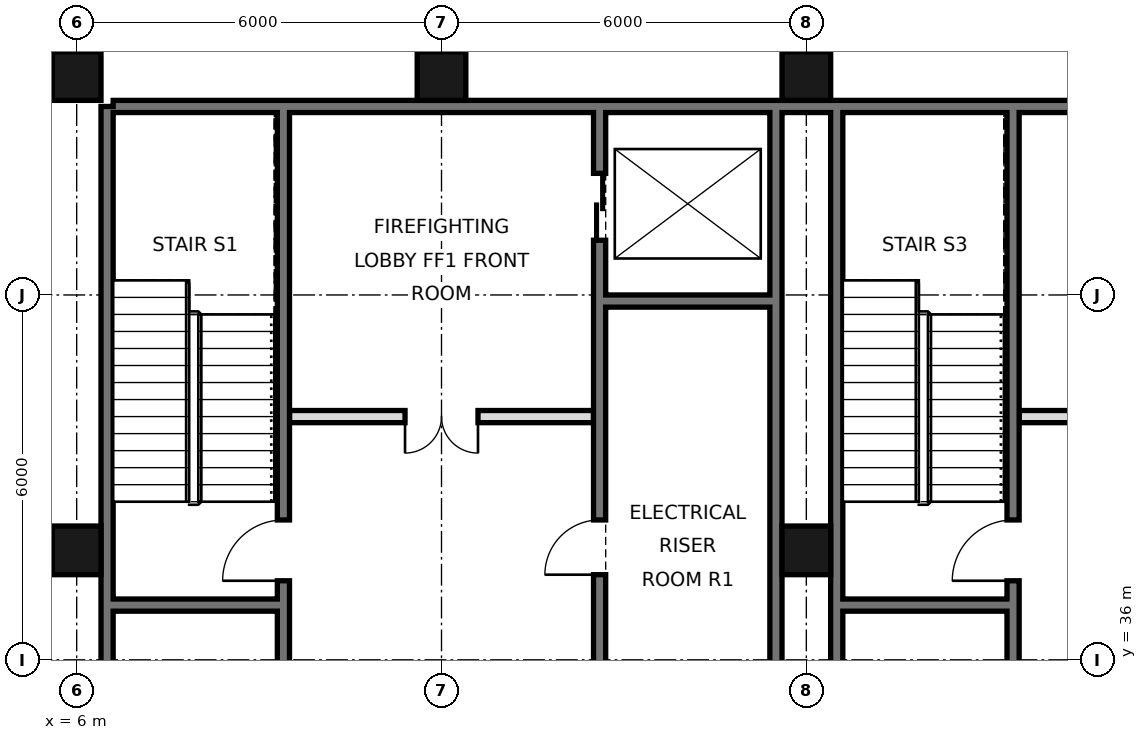
"""IFC4 building model, lengths in metres.
Left out: names, types, materials, properties, quantities, classifications, styles, units other than length and angle.
Written with IfcOpenShell. Run it as: python <this file> out.ifc"""

import sys

from ifc_helpers import new_model, si_unit, direction, frame, frame_2d, origin, origin_2d, place, context, subcontext, project, spatial, rectangle, hollow_rectangle, extrude, element, fill, save


model = new_model("IFC4")
c1 = context("Model", 3, precision=1e-05, world=origin(), true_north=direction((0.0, 1.0)))
c2 = subcontext(c1, "Body", "Model", "MODEL_VIEW")
j1 = project(units=[si_unit("LENGTHUNIT", "METRE"), si_unit("PLANEANGLEUNIT", "RADIAN")], contexts=[c1])
p1 = place(None, origin())
s1 = spatial("IfcSite", under=j1, at=p1, CompositionType="ELEMENT")
p2 = place(p1, origin())
s2 = spatial("IfcBuilding", under=s1, at=p2, CompositionType="ELEMENT")
p3 = place(p2, frame((0.0, 0.0, 277.4)))
s3 = spatial("IfcBuildingStorey", under=s2, at=p3, CompositionType="ELEMENT", Elevation=277.4)
for number, where, z_axis, x_axis in (
    (1, (6.0, 37.8, 0.0), (0.0, 0.0, 1.0), (1.0, 0.0, 0.0)),
    (2, (6.0, 45.6, 0.0), (0.0, 0.0, 1.0), (1.0, 0.0, 0.0)),
    (3, (12.0, 45.6, 0.0), (0.0, 0.0, 1.0), (1.0, 0.0, 0.0)),
    (4, (18.0, 37.8, 0.0), (0.0, 0.0, 1.0), (1.0, 0.0, 0.0)),
    (5, (18.0, 45.6, 0.0), (0.0, 0.0, 1.0), (1.0, 0.0, 0.0)),
):
    element("IfcColumn", number, at=place(p3, frame(where, z_axis=z_axis, x_axis=x_axis)), inside=s3, PredefinedType="COLUMN", context=c2, shape_type="SweptSolid", body=[
        extrude(hollow_rectangle(XDim=0.8, YDim=0.8, WallThickness=0.032, at=origin_2d()), origin(), (0.0, 0.0, 1.0), 4.4),
    ])
p4 = place(p3, frame((6.5, 21.6, 0.0), z_axis=(0.0, 0.0, 1.0), x_axis=(0.0, 1.0, 0.0)))
e6 = element("IfcWall", 6, at=p4, inside=s3, PredefinedType="SOLIDWALL", context=c2, shape_type="SweptSolid", body=[
    extrude(rectangle(XDim=23.5, YDim=0.2, at=frame_2d((11.75, 0.0))), origin(), (0.0, 0.0, 1.0), 4.1),
])
p5 = place(p3, frame((6.6, 45.1, 0.0), z_axis=(0.0, 0.0, 1.0), x_axis=(1.0, 0.0, 0.0)))
e7 = element("IfcWall", 7, at=p5, inside=s3, PredefinedType="SOLIDWALL", context=c2, shape_type="SweptSolid", body=[
    extrude(rectangle(XDim=34.8, YDim=0.2, at=frame_2d((17.4, 0.0))), origin(), (0.0, 0.0, 1.0), 4.1),
])
for number, where, z_axis, x_axis in (
    (8, (17.5, 27.6, 0.0), (0.0, 0.0, 1.0), (0.0, 1.0, 0.0)),
    (9, (18.5, 27.6, 0.0), (0.0, 0.0, 1.0), (0.0, 1.0, 0.0)),
):
    element("IfcWall", number, at=place(p3, frame(where, z_axis=z_axis, x_axis=x_axis)), inside=s3, PredefinedType="SOLIDWALL", context=c2, shape_type="SweptSolid", body=[
        extrude(rectangle(XDim=17.5, YDim=0.2, at=frame_2d((8.75, 0.0))), origin(), (0.0, 0.0, 1.0), 4.1),
    ])
p6 = place(p3, frame((14.6, 27.5, 0.0), z_axis=(0.0, 0.0, 1.0), x_axis=(0.0, 1.0, 0.0)))
e10 = element("IfcWall", 10, at=p6, inside=s3, PredefinedType="SOLIDWALL", context=c2, shape_type="SweptSolid", body=[
    extrude(rectangle(XDim=17.5, YDim=0.2, at=frame_2d((8.75, 0.0))), origin(), (0.0, 0.0, 1.0), 4.1),
])
p7 = place(p6, frame((15.4, 0.0, 0.0)))
e11 = element("IfcOpeningElement", 11, at=p7, cuts=e10, PredefinedType="OPENING", context=c2, shape_type="SweptSolid", body=[
    extrude(rectangle(XDim=1.1, YDim=2.1, at=frame_2d((0.55, 1.05))), frame((0.0, 0.11, 0.0), z_axis=(0.0, -1.0, 0.0), x_axis=(1.0, 0.0, 0.0)), (0.0, 0.0, 1.0), 0.22),
])
p8 = place(p6, frame((2.7, 0.0, 0.0)))
e12 = element("IfcOpeningElement", 12, at=p8, cuts=e10, PredefinedType="OPENING", context=c2, shape_type="SweptSolid", body=[
    extrude(rectangle(XDim=1.0, YDim=2.1, at=frame_2d((0.5, 1.05))), frame((0.0, 0.11, 0.0), z_axis=(0.0, -1.0, 0.0), x_axis=(1.0, 0.0, 0.0)), (0.0, 0.0, 1.0), 0.22),
])
p9 = place(p6, frame((9.9, 0.0, 0.0)))
e13 = element("IfcOpeningElement", 13, at=p9, cuts=e10, PredefinedType="OPENING", context=c2, shape_type="SweptSolid", body=[
    extrude(rectangle(XDim=0.9, YDim=2.1, at=frame_2d((0.45, 1.05))), frame((0.0, 0.11, 0.0), z_axis=(0.0, -1.0, 0.0), x_axis=(1.0, 0.0, 0.0)), (0.0, 0.0, 1.0), 0.22),
])
p10 = place(p3, frame((21.4, 27.5, 0.0), z_axis=(0.0, 0.0, 1.0), x_axis=(0.0, 1.0, 0.0)))
e14 = element("IfcWall", 14, at=p10, inside=s3, PredefinedType="SOLIDWALL", context=c2, shape_type="SweptSolid", body=[
    extrude(rectangle(XDim=17.5, YDim=0.2, at=frame_2d((8.75, 0.0))), origin(), (0.0, 0.0, 1.0), 4.1),
])
p11 = place(p10, frame((0.6, 0.0, 0.0)))
e15 = element("IfcOpeningElement", 15, at=p11, cuts=e14, PredefinedType="OPENING", context=c2, shape_type="SweptSolid", body=[
    extrude(rectangle(XDim=1.0, YDim=2.1, at=frame_2d((0.5, 1.05))), frame((0.0, 0.11, 0.0), z_axis=(0.0, -1.0, 0.0), x_axis=(1.0, 0.0, 0.0)), (0.0, 0.0, 1.0), 0.22),
])
p12 = place(p10, frame((3.7, 0.0, 0.0)))
e16 = element("IfcOpeningElement", 16, at=p12, cuts=e14, PredefinedType="OPENING", context=c2, shape_type="SweptSolid", body=[
    extrude(rectangle(XDim=1.0, YDim=2.1, at=frame_2d((0.5, 1.05))), frame((0.0, 0.11, 0.0), z_axis=(0.0, -1.0, 0.0), x_axis=(1.0, 0.0, 0.0)), (0.0, 0.0, 1.0), 0.22),
])
p13 = place(p10, frame((9.8, 0.0, 0.0)))
e17 = element("IfcOpeningElement", 17, at=p13, cuts=e14, PredefinedType="OPENING", context=c2, shape_type="SweptSolid", body=[
    extrude(rectangle(XDim=1.0, YDim=2.1, at=frame_2d((0.5, 1.05))), frame((0.0, 0.11, 0.0), z_axis=(0.0, -1.0, 0.0), x_axis=(1.0, 0.0, 0.0)), (0.0, 0.0, 1.0), 0.22),
])
p14 = place(p10, frame((7.4, 0.0, 0.0)))
e18 = element("IfcOpeningElement", 18, at=p14, cuts=e14, PredefinedType="OPENING", context=c2, shape_type="SweptSolid", body=[
    extrude(rectangle(XDim=0.9, YDim=2.1, at=frame_2d((0.45, 1.05))), frame((0.0, 0.11, 0.0), z_axis=(0.0, -1.0, 0.0), x_axis=(1.0, 0.0, 0.0)), (0.0, 0.0, 1.0), 0.22),
])
p15 = place(p3, frame((9.4, 21.6, 0.0), z_axis=(0.0, 0.0, 1.0), x_axis=(0.0, 1.0, 0.0)))
e19 = element("IfcWall", 19, at=p15, inside=s3, PredefinedType="SOLIDWALL", context=c2, shape_type="SweptSolid", body=[
    extrude(rectangle(XDim=23.4, YDim=0.2, at=frame_2d((11.7, 0.0))), origin(), (0.0, 0.0, 1.0), 4.1),
])
p16 = place(p15, frame((7.95, 0.0, 0.0)))
e20 = element("IfcOpeningElement", 20, at=p16, cuts=e19, PredefinedType="OPENING", context=c2, shape_type="SweptSolid", body=[
    extrude(rectangle(XDim=1.0, YDim=2.1, at=frame_2d((0.5, 1.05))), frame((0.0, 0.11, 0.0), z_axis=(0.0, -1.0, 0.0), x_axis=(1.0, 0.0, 0.0)), (0.0, 0.0, 1.0), 0.22),
])
p17 = place(p15, frame((12.6, 0.0, 0.0)))
e21 = element("IfcOpeningElement", 21, at=p17, cuts=e19, PredefinedType="OPENING", context=c2, shape_type="SweptSolid", body=[
    extrude(rectangle(XDim=1.0, YDim=2.1, at=frame_2d((0.5, 1.05))), frame((0.0, 0.11, 0.0), z_axis=(0.0, -1.0, 0.0), x_axis=(1.0, 0.0, 0.0)), (0.0, 0.0, 1.0), 0.22),
])
p18 = place(p15, frame((15.7, 0.0, 0.0)))
e22 = element("IfcOpeningElement", 22, at=p18, cuts=e19, PredefinedType="OPENING", context=c2, shape_type="SweptSolid", body=[
    extrude(rectangle(XDim=1.0, YDim=2.1, at=frame_2d((0.5, 1.05))), frame((0.0, 0.11, 0.0), z_axis=(0.0, -1.0, 0.0), x_axis=(1.0, 0.0, 0.0)), (0.0, 0.0, 1.0), 0.22),
])
p19 = place(p15, frame((0.175, 0.0, 0.0)))
e23 = element("IfcOpeningElement", 23, at=p19, cuts=e19, PredefinedType="OPENING", context=c2, shape_type="SweptSolid", body=[
    extrude(rectangle(XDim=0.9, YDim=2.1, at=frame_2d((0.45, 1.05))), frame((0.0, 0.11, 0.0), z_axis=(0.0, -1.0, 0.0), x_axis=(1.0, 0.0, 0.0)), (0.0, 0.0, 1.0), 0.22),
])
for number, where, z_axis, x_axis in (
    (24, (18.6, 36.9, 0.0), (0.0, 0.0, 1.0), (1.0, 0.0, 0.0)),
    (25, (6.6, 36.9, 0.0), (0.0, 0.0, 1.0), (1.0, 0.0, 0.0)),
):
    element("IfcWall", number, at=place(p3, frame(where, z_axis=z_axis, x_axis=x_axis)), inside=s3, PredefinedType="SOLIDWALL", context=c2, shape_type="SweptSolid", body=[
        extrude(rectangle(XDim=2.7, YDim=0.2, at=frame_2d((1.35, 0.0))), origin(), (0.0, 0.0, 1.0), 4.1),
    ])
p20 = place(p3, frame((21.5, 40.0, 0.0), z_axis=(0.0, 0.0, 1.0), x_axis=(1.0, 0.0, 0.0)))
e26 = element("IfcWall", 26, at=p20, inside=s3, PredefinedType="PARTITIONING", context=c2, shape_type="SweptSolid", body=[
    extrude(rectangle(XDim=5.0, YDim=0.2, at=frame_2d((2.5, 0.0))), origin(), (0.0, 0.0, 1.0), 4.1),
])
p21 = place(p20, frame((1.9, 0.0, 0.0)))
e27 = element("IfcOpeningElement", 27, at=p21, cuts=e26, PredefinedType="OPENING", context=c2, shape_type="SweptSolid", body=[
    extrude(rectangle(XDim=1.2, YDim=2.1, at=frame_2d((0.6, 1.05))), frame((0.0, 0.11, 0.0), z_axis=(0.0, -1.0, 0.0), x_axis=(1.0, 0.0, 0.0)), (0.0, 0.0, 1.0), 0.22),
])
p22 = place(p3, frame((9.5, 40.0, 0.0), z_axis=(0.0, 0.0, 1.0), x_axis=(1.0, 0.0, 0.0)))
e28 = element("IfcWall", 28, at=p22, inside=s3, PredefinedType="PARTITIONING", context=c2, shape_type="SweptSolid", body=[
    extrude(rectangle(XDim=5.0, YDim=0.2, at=frame_2d((2.5, 0.0))), origin(), (0.0, 0.0, 1.0), 4.1),
])
p23 = place(p22, frame((1.9, 0.0, 0.0)))
e29 = element("IfcOpeningElement", 29, at=p23, cuts=e28, PredefinedType="OPENING", context=c2, shape_type="SweptSolid", body=[
    extrude(rectangle(XDim=1.2, YDim=2.1, at=frame_2d((0.6, 1.05))), frame((0.0, 0.11, 0.0), z_axis=(0.0, -1.0, 0.0), x_axis=(1.0, 0.0, 0.0)), (0.0, 0.0, 1.0), 0.22),
])
p24 = place(p3, frame((14.7, 41.9, 0.0), z_axis=(0.0, 0.0, 1.0), x_axis=(1.0, 0.0, 0.0)))
e30 = element("IfcWall", 30, at=p24, inside=s3, PredefinedType="SOLIDWALL", context=c2, shape_type="SweptSolid", body=[
    extrude(rectangle(XDim=2.7, YDim=0.2, at=frame_2d((1.35, 0.0))), origin(), (0.0, 0.0, 1.0), 4.1),
])
p25 = place(p23, frame((1.2, 0.0, 0.0), z_axis=(0.0, 0.0, 1.0), x_axis=(-1.0, 0.0, 0.0)))
e31 = element("IfcDoor", 31, at=p25, inside=s3, OperationType="DOUBLE_DOOR_SINGLE_SWING", PredefinedType="DOOR", context=c2, shape_type="SweptSolid", body=[
    extrude(rectangle(XDim=1.2, YDim=2.1, at=frame_2d((0.6, 1.05))), frame((0.0, 0.025, 0.0), z_axis=(0.0, -1.0, 0.0), x_axis=(1.0, 0.0, 0.0)), (0.0, 0.0, 1.0), 0.05),
])
fill(e29, e31)
p26 = place(p7, origin())
e32 = element("IfcDoor", 32, at=p26, inside=s3, OperationType="DOUBLE_DOOR_SLIDING", PredefinedType="DOOR", context=c2, shape_type="SweptSolid", body=[
    extrude(rectangle(XDim=1.1, YDim=2.1, at=frame_2d((0.55, 1.05))), frame((0.0, 0.025, 0.0), z_axis=(0.0, -1.0, 0.0), x_axis=(1.0, 0.0, 0.0)), (0.0, 0.0, 1.0), 0.05),
])
fill(e11, e32)
p27 = place(p18, origin())
e33 = element("IfcDoor", 33, at=p27, inside=s3, OperationType="SINGLE_SWING_LEFT", PredefinedType="DOOR", context=c2, shape_type="SweptSolid", body=[
    extrude(rectangle(XDim=1.0, YDim=2.1, at=frame_2d((0.5, 1.05))), frame((0.0, 0.025, 0.0), z_axis=(0.0, -1.0, 0.0), x_axis=(1.0, 0.0, 0.0)), (0.0, 0.0, 1.0), 0.05),
])
fill(e22, e33)
p28 = place(p13, origin())
e34 = element("IfcDoor", 34, at=p28, inside=s3, OperationType="SINGLE_SWING_LEFT", PredefinedType="DOOR", context=c2, shape_type="SweptSolid", body=[
    extrude(rectangle(XDim=1.0, YDim=2.1, at=frame_2d((0.5, 1.05))), frame((0.0, 0.025, 0.0), z_axis=(0.0, -1.0, 0.0), x_axis=(1.0, 0.0, 0.0)), (0.0, 0.0, 1.0), 0.05),
])
fill(e17, e34)
p29 = place(p9, origin())
e35 = element("IfcDoor", 35, at=p29, inside=s3, OperationType="SINGLE_SWING_LEFT", PredefinedType="DOOR", context=c2, shape_type="SweptSolid", body=[
    extrude(rectangle(XDim=0.9, YDim=2.1, at=frame_2d((0.45, 1.05))), frame((0.0, 0.025, 0.0), z_axis=(0.0, -1.0, 0.0), x_axis=(1.0, 0.0, 0.0)), (0.0, 0.0, 1.0), 0.05),
])
fill(e13, e35)
save(model, sys.argv[1])
